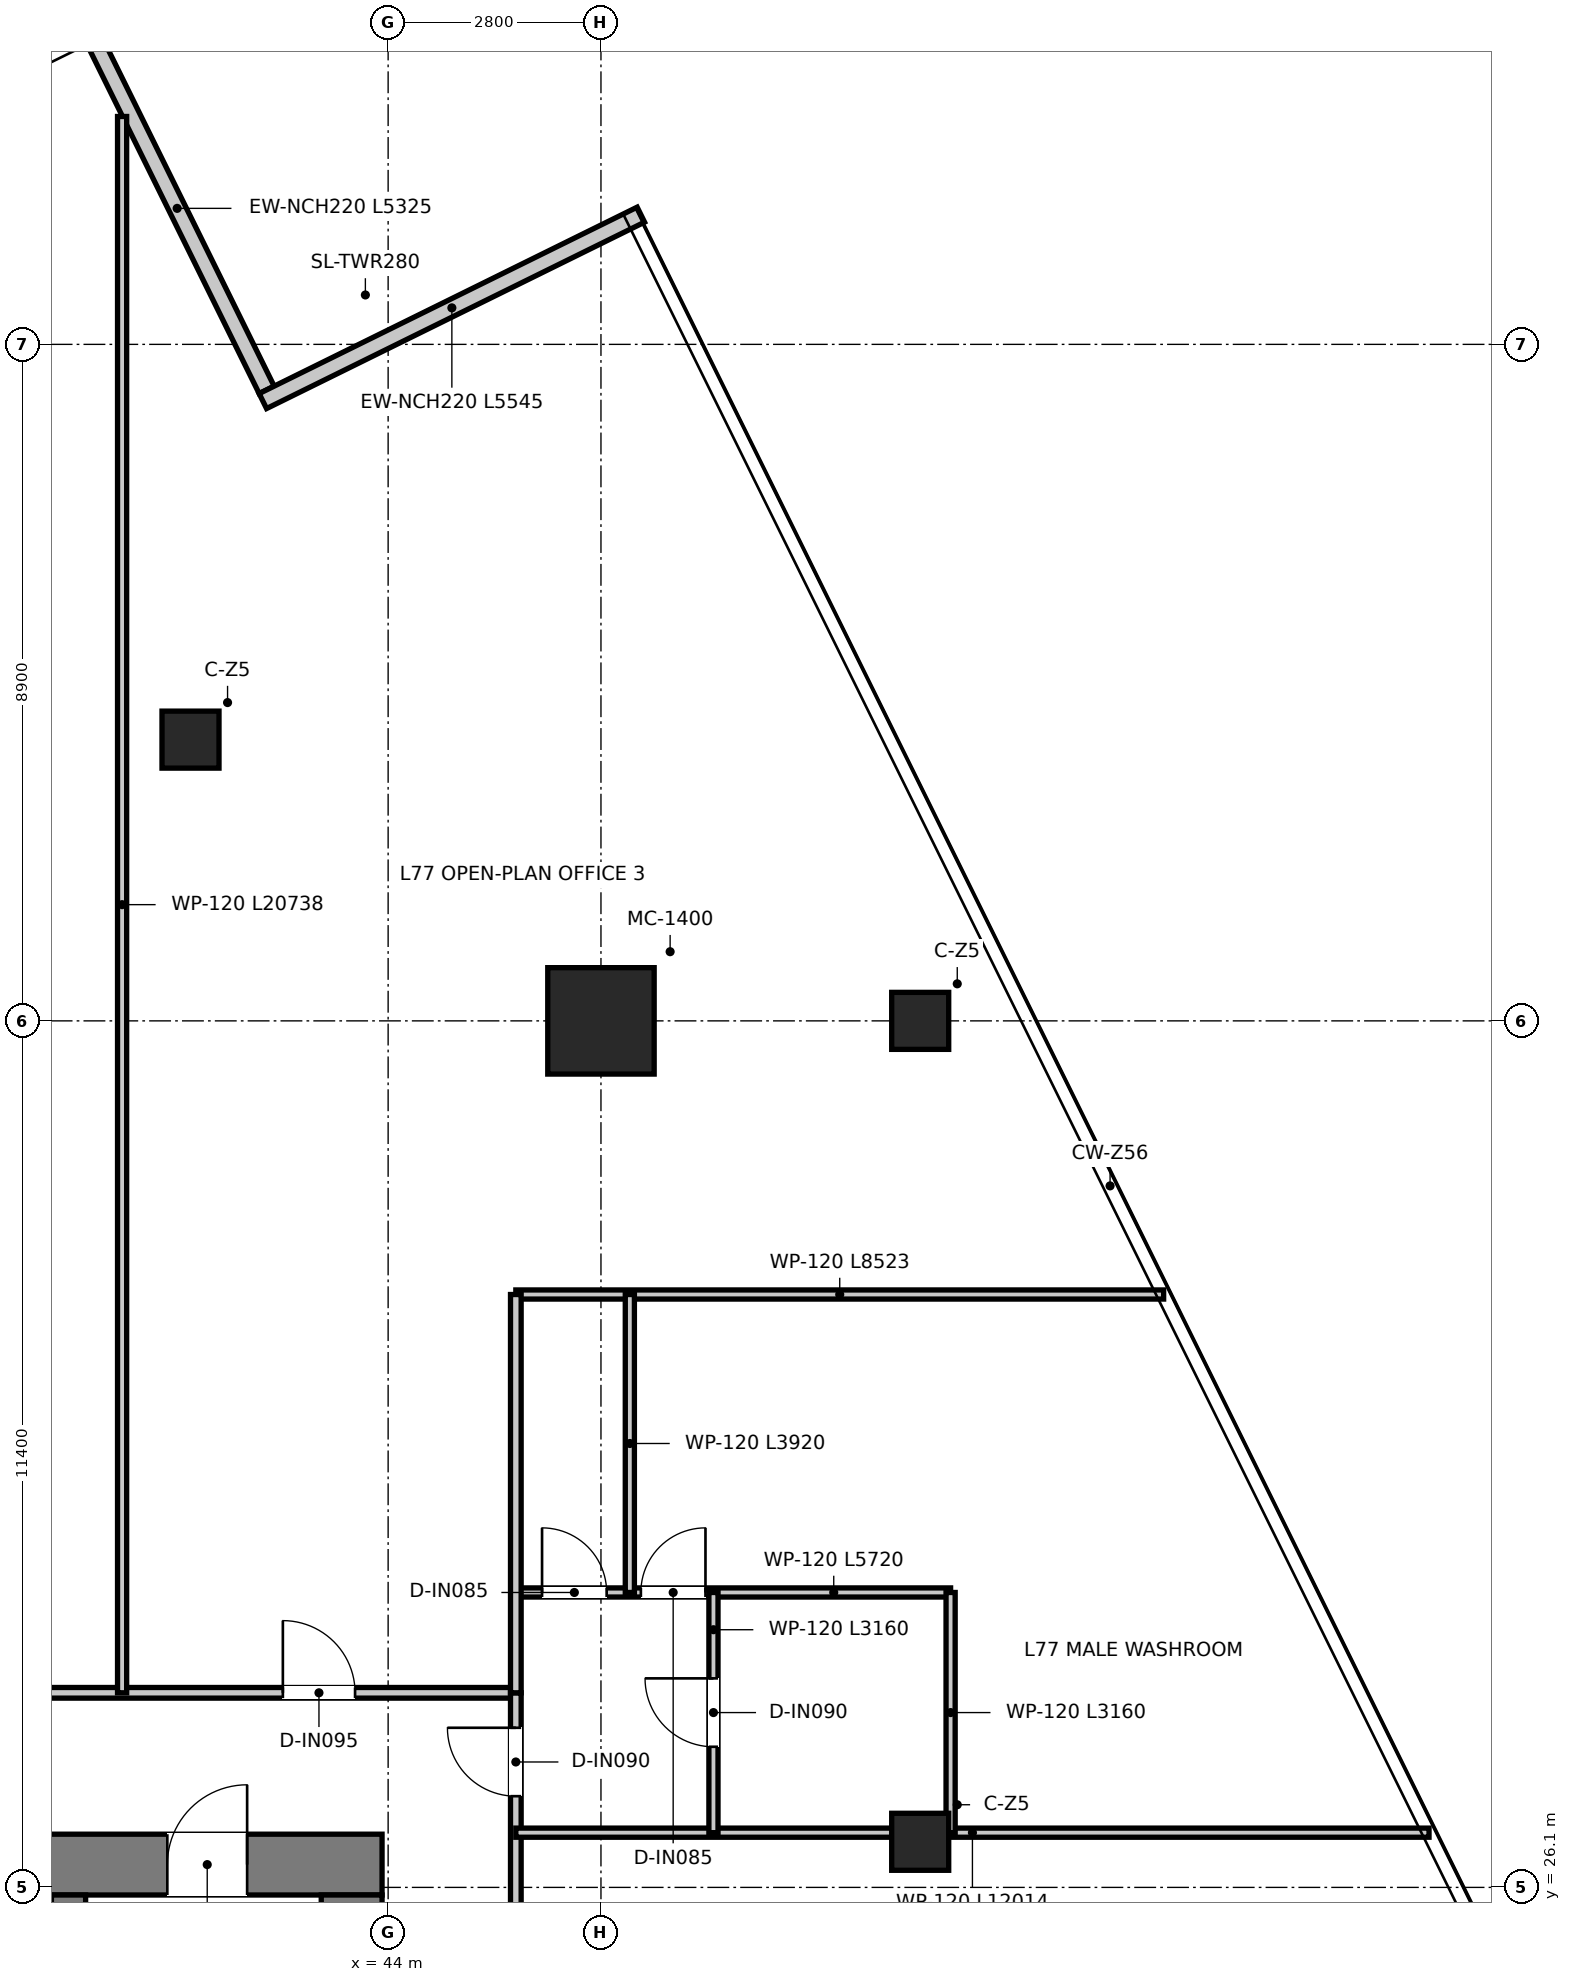
"""IFC4 building model, lengths in metres.
Left out: names, types, materials, properties, quantities, classifications, styles, units other than length and angle.
Written with IfcOpenShell. Run it as: python <this file> out.ifc"""

import sys

from ifc_helpers import new_model, si_unit, direction, frame, frame_2d, origin, origin_2d, place, context, subcontext, project, spatial, rectangle, extrude, source, transform, mapped, element, fill, save


model = new_model("IFC4")
c1 = context("Model", 3, precision=1e-05, world=origin(), true_north=direction((0.0, 1.0)))
c2 = subcontext(c1, "Body", "Model", "MODEL_VIEW")
j1 = project(units=[si_unit("LENGTHUNIT", "METRE"), si_unit("PLANEANGLEUNIT", "RADIAN")], contexts=[c1])
p1 = place(None, origin())
s1 = spatial("IfcSite", under=j1, at=p1, CompositionType="ELEMENT")
p2 = place(p1, origin())
s2 = spatial("IfcBuilding", under=s1, at=p2, CompositionType="ELEMENT")
p3 = place(p2, frame((0.0, 0.0, 314.8)))
s3 = spatial("IfcBuildingStorey", under=s2, at=p3, CompositionType="ELEMENT", Elevation=314.8)
p4 = place(p3, frame((28.08, 26.4, 0.0), z_axis=(0.0, 0.0, 1.0), x_axis=(1.0, 0.0, 0.0)))
e1 = element("IfcWall", 1, at=p4, inside=s3, PredefinedType="SHEAR", context=c2, shape_type="SweptSolid", body=[
    extrude(rectangle(XDim=15.84, YDim=0.8, at=frame_2d((7.92, 0.0))), origin(), (0.0, 0.0, 1.0), 3.95),
])
p5 = place(p4, frame((7.22, 0.0, 0.0)))
e2 = element("IfcOpeningElement", 2, at=p5, cuts=e1, PredefinedType="OPENING", context=c2, shape_type="SweptSolid", body=[
    extrude(rectangle(XDim=1.4, YDim=2.2, at=frame_2d((0.7, 1.1))), frame((0.0, 0.41, 0.0), z_axis=(0.0, -1.0, 0.0), x_axis=(1.0, 0.0, 0.0)), (0.0, 0.0, 1.0), 0.82),
])
p6 = place(p4, frame((1.775, 0.0, 0.0)))
e3 = element("IfcOpeningElement", 3, at=p6, cuts=e1, PredefinedType="OPENING", context=c2, shape_type="SweptSolid", body=[
    extrude(rectangle(XDim=1.05, YDim=2.1, at=frame_2d((0.525, 1.05))), frame((0.0, 0.41, 0.0), z_axis=(0.0, -1.0, 0.0), x_axis=(1.0, 0.0, 0.0)), (0.0, 0.0, 1.0), 0.82),
])
p7 = place(p4, frame((13.015, 0.0, 0.0)))
e4 = element("IfcOpeningElement", 4, at=p7, cuts=e1, PredefinedType="OPENING", context=c2, shape_type="SweptSolid", body=[
    extrude(rectangle(XDim=1.05, YDim=2.1, at=frame_2d((0.525, 1.05))), frame((0.0, 0.41, 0.0), z_axis=(0.0, -1.0, 0.0), x_axis=(1.0, 0.0, 0.0)), (0.0, 0.0, 1.0), 0.82),
])
p8 = place(p3, frame((43.52, 11.3, 0.0), z_axis=(0.0, 0.0, 1.0), x_axis=(0.0, 1.0, 0.0)))
e5 = element("IfcWall", 5, at=p8, inside=s3, PredefinedType="SHEAR", context=c2, shape_type="SweptSolid", body=[
    extrude(rectangle(XDim=14.7, YDim=0.8, at=frame_2d((7.35, 0.0))), origin(), (0.0, 0.0, 1.0), 3.95),
])
p9 = place(p3, frame((39.795, 13.22, 0.0), z_axis=(0.0, 0.0, 1.0), x_axis=(0.0, 1.0, 0.0)))
e6 = element("IfcWall", 6, at=p9, inside=s3, PredefinedType="SHEAR", context=c2, shape_type="SweptSolid", body=[
    extrude(rectangle(XDim=12.78, YDim=0.45, at=frame_2d((6.39, 0.0))), origin(), (0.0, 0.0, 1.0), 3.95),
])
p10 = place(p9, frame((10.58, 0.0, 0.0)))
e7 = element("IfcOpeningElement", 7, at=p10, cuts=e6, PredefinedType="OPENING", context=c2, shape_type="SweptSolid", body=[
    extrude(rectangle(XDim=1.1, YDim=2.15, at=frame_2d((0.55, 1.075))), frame((0.0, 0.235, 0.0), z_axis=(0.0, -1.0, 0.0), x_axis=(1.0, 0.0, 0.0)), (0.0, 0.0, 1.0), 0.47),
])
m1 = source(origin(), c2, "Body", "SweptSolid", [
    extrude(rectangle(XDim=1.4, YDim=1.4, at=origin_2d()), origin(), (0.0, 0.0, 1.0), 3.95),
])
p11 = place(p3, frame((46.8, 37.5, 0.0), z_axis=(0.0, 0.0, 1.0), x_axis=(1.0, 0.0, 0.0)))
e8 = element("IfcColumn", 8, at=p11, inside=s3, PredefinedType="USERDEFINED", context=c2, shape_type="MappedRepresentation", body=[
    mapped(m1, transform((0.0, 0.0, 0.0), x_axis=(1.0, 0.0, 0.0), y_axis=(0.0, 1.0, 0.0), z_axis=(0.0, 0.0, 1.0), scale=1.0)),
])
m2 = source(origin(), c2, "Body", "SweptSolid", [
    extrude(rectangle(XDim=0.75, YDim=0.75, at=origin_2d()), origin(), (0.0, 0.0, 1.0), 3.95),
])
for number, where, z_axis, x_axis in (
    (9, (41.4, 41.2, 0.0), (0.0, 0.0, 1.0), (1.0, 0.0, 0.0)),
    (10, (51.0, 37.5, 0.0), (0.0, 0.0, 1.0), (1.0, 0.0, 0.0)),
    (11, (51.0, 26.7, 0.0), (0.0, 0.0, 1.0), (1.0, 0.0, 0.0)),
):
    element("IfcColumn", number, at=place(p3, frame(where, z_axis=z_axis, x_axis=x_axis)), inside=s3, PredefinedType="COLUMN", context=c2, shape_type="MappedRepresentation", body=[
        mapped(m2, transform((0.0, 0.0, 0.0), x_axis=(1.0, 0.0, 0.0), y_axis=(0.0, 1.0, 0.0), z_axis=(0.0, 0.0, 1.0), scale=1.0)),
    ])
p12 = place(p3, frame((42.402, 45.801, 0.0), z_axis=(0.0, 0.0, 1.0), x_axis=(-0.442291978932, 0.896871119712, 0.0)))
e12 = element("IfcWall", 12, at=p12, inside=s3, PredefinedType="ELEMENTEDWALL", context=c2, shape_type="SweptSolid", body=[
    extrude(rectangle(XDim=5.325, YDim=0.22, at=frame_2d((2.663, 0.0))), origin(), (0.0, 0.0, 1.0), 3.59),
])
p13 = place(p3, frame((47.325, 48.106, 0.0), z_axis=(0.0, 0.0, 1.0), x_axis=(-0.896879244314, -0.442275503639, 0.0)))
e13 = element("IfcWall", 13, at=p13, inside=s3, PredefinedType="ELEMENTEDWALL", context=c2, shape_type="SweptSolid", body=[
    extrude(rectangle(XDim=5.545, YDim=0.22, at=frame_2d((2.772, 0.0))), origin(), (0.0, 0.0, 1.0), 3.59),
])
p14 = place(p3, frame((26.32, 28.66, 0.0), z_axis=(0.0, 0.0, 1.0), x_axis=(1.0, 0.0, 0.0)))
e14 = element("IfcWall", 14, at=p14, inside=s3, PredefinedType="PARTITIONING", context=c2, shape_type="SweptSolid", body=[
    extrude(rectangle(XDim=19.36, YDim=0.14, at=frame_2d((9.68, 0.0))), origin(), (0.0, 0.0, 1.0), 3.1),
])
p15 = place(p14, frame((2.865, 0.0, 0.0)))
e15 = element("IfcOpeningElement", 15, at=p15, cuts=e14, PredefinedType="OPENING", context=c2, shape_type="SweptSolid", body=[
    extrude(rectangle(XDim=0.95, YDim=2.1, at=frame_2d((0.475, 1.05))), frame((0.0, 0.08, 0.0), z_axis=(0.0, -1.0, 0.0), x_axis=(1.0, 0.0, 0.0)), (0.0, 0.0, 1.0), 0.16),
])
p16 = place(p14, frame((9.955, 0.0, 0.0)))
e16 = element("IfcOpeningElement", 16, at=p16, cuts=e14, PredefinedType="OPENING", context=c2, shape_type="SweptSolid", body=[
    extrude(rectangle(XDim=0.95, YDim=2.1, at=frame_2d((0.475, 1.05))), frame((0.0, 0.08, 0.0), z_axis=(0.0, -1.0, 0.0), x_axis=(1.0, 0.0, 0.0)), (0.0, 0.0, 1.0), 0.16),
])
p17 = place(p14, frame((16.295, 0.0, 0.0)))
e17 = element("IfcOpeningElement", 17, at=p17, cuts=e14, PredefinedType="OPENING", context=c2, shape_type="SweptSolid", body=[
    extrude(rectangle(XDim=0.95, YDim=2.1, at=frame_2d((0.475, 1.05))), frame((0.0, 0.08, 0.0), z_axis=(0.0, -1.0, 0.0), x_axis=(1.0, 0.0, 0.0)), (0.0, 0.0, 1.0), 0.16),
])
p18 = place(p3, frame((45.68, 9.72, 0.0), z_axis=(0.0, 0.0, 1.0), x_axis=(0.0, 1.0, 0.0)))
e18 = element("IfcWall", 18, at=p18, inside=s3, PredefinedType="PARTITIONING", context=c2, shape_type="SweptSolid", body=[
    extrude(rectangle(XDim=18.94, YDim=0.14, at=frame_2d((9.47, 0.0))), origin(), (0.0, 0.0, 1.0), 3.05),
])
p19 = place(p18, frame((17.58, 0.0, 0.0)))
e19 = element("IfcOpeningElement", 19, at=p19, cuts=e18, PredefinedType="OPENING", context=c2, shape_type="SweptSolid", body=[
    extrude(rectangle(XDim=0.9, YDim=2.1, at=frame_2d((0.45, 1.05))), frame((0.0, 0.08, 0.0), z_axis=(0.0, -1.0, 0.0), x_axis=(1.0, 0.0, 0.0)), (0.0, 0.0, 1.0), 0.16),
])
p20 = place(p18, frame((11.99, 0.0, 0.0)))
e20 = element("IfcOpeningElement", 20, at=p20, cuts=e18, PredefinedType="OPENING", context=c2, shape_type="SweptSolid", body=[
    extrude(rectangle(XDim=0.9, YDim=2.1, at=frame_2d((0.45, 1.05))), frame((0.0, 0.08, 0.0), z_axis=(0.0, -1.0, 0.0), x_axis=(1.0, 0.0, 0.0)), (0.0, 0.0, 1.0), 0.16),
])
p21 = place(p3, frame((45.68, 26.82, 0.0), z_axis=(0.0, 0.0, 1.0), x_axis=(1.0, 0.0, 0.0)))
e21 = element("IfcWall", 21, at=p21, inside=s3, PredefinedType="PARTITIONING", context=c2, shape_type="SweptSolid", body=[
    extrude(rectangle(XDim=12.014, YDim=0.12, at=frame_2d((6.007, 0.0))), origin(), (0.0, 0.0, 1.0), 3.05),
])
p22 = place(p3, frame((45.68, 33.9, 0.0), z_axis=(0.0, 0.0, 1.0), x_axis=(1.0, 0.0, 0.0)))
e22 = element("IfcWall", 22, at=p22, inside=s3, PredefinedType="PARTITIONING", context=c2, shape_type="SweptSolid", body=[
    extrude(rectangle(XDim=8.523, YDim=0.12, at=frame_2d((4.261, 0.0))), origin(), (0.0, 0.0, 1.0), 3.05),
])
p23 = place(p3, frame((45.68, 29.98, 0.0), z_axis=(0.0, 0.0, 1.0), x_axis=(1.0, 0.0, 0.0)))
e23 = element("IfcWall", 23, at=p23, inside=s3, PredefinedType="PARTITIONING", context=c2, shape_type="SweptSolid", body=[
    extrude(rectangle(XDim=5.72, YDim=0.12, at=frame_2d((2.86, 0.0))), origin(), (0.0, 0.0, 1.0), 3.05),
])
p24 = place(p23, frame((1.645, 0.0, 0.0)))
e24 = element("IfcOpeningElement", 24, at=p24, cuts=e23, PredefinedType="OPENING", context=c2, shape_type="SweptSolid", body=[
    extrude(rectangle(XDim=0.85, YDim=2.1, at=frame_2d((0.425, 1.05))), frame((0.0, 0.07, 0.0), z_axis=(0.0, -1.0, 0.0), x_axis=(1.0, 0.0, 0.0)), (0.0, 0.0, 1.0), 0.14),
])
p25 = place(p23, frame((0.345, 0.0, 0.0)))
e25 = element("IfcOpeningElement", 25, at=p25, cuts=e23, PredefinedType="OPENING", context=c2, shape_type="SweptSolid", body=[
    extrude(rectangle(XDim=0.85, YDim=2.1, at=frame_2d((0.425, 1.05))), frame((0.0, 0.07, 0.0), z_axis=(0.0, -1.0, 0.0), x_axis=(1.0, 0.0, 0.0)), (0.0, 0.0, 1.0), 0.14),
])
p26 = place(p3, frame((51.4, 26.82, 0.0), z_axis=(0.0, 0.0, 1.0), x_axis=(0.0, 1.0, 0.0)))
e26 = element("IfcWall", 26, at=p26, inside=s3, PredefinedType="PARTITIONING", context=c2, shape_type="SweptSolid", body=[
    extrude(rectangle(XDim=3.16, YDim=0.12, at=frame_2d((1.58, 0.0))), origin(), (0.0, 0.0, 1.0), 3.59),
])
p27 = place(p3, frame((48.28, 26.82, 0.0), z_axis=(0.0, 0.0, 1.0), x_axis=(0.0, 1.0, 0.0)))
e27 = element("IfcWall", 27, at=p27, inside=s3, PredefinedType="PARTITIONING", context=c2, shape_type="SweptSolid", body=[
    extrude(rectangle(XDim=3.16, YDim=0.12, at=frame_2d((1.58, 0.0))), origin(), (0.0, 0.0, 1.0), 3.1),
])
p28 = place(p27, frame((1.13, 0.0, 0.0)))
e28 = element("IfcOpeningElement", 28, at=p28, cuts=e27, PredefinedType="OPENING", context=c2, shape_type="SweptSolid", body=[
    extrude(rectangle(XDim=0.9, YDim=2.1, at=frame_2d((0.45, 1.05))), frame((0.0, 0.07, 0.0), z_axis=(0.0, -1.0, 0.0), x_axis=(1.0, 0.0, 0.0)), (0.0, 0.0, 1.0), 0.14),
])
p29 = place(p3, frame((47.18, 29.98, 0.0), z_axis=(0.0, 0.0, 1.0), x_axis=(0.0, 1.0, 0.0)))
e29 = element("IfcWall", 29, at=p29, inside=s3, PredefinedType="PARTITIONING", context=c2, shape_type="SweptSolid", body=[
    extrude(rectangle(XDim=3.92, YDim=0.12, at=frame_2d((1.96, 0.0))), origin(), (0.0, 0.0, 1.0), 3.23),
])
p30 = place(p3, frame((45.68, 28.66, 0.0), z_axis=(0.0, 0.0, 1.0), x_axis=(0.0, 1.0, 0.0)))
e30 = element("IfcWall", 30, at=p30, inside=s3, PredefinedType="PARTITIONING", context=c2, shape_type="SweptSolid", body=[
    extrude(rectangle(XDim=5.24, YDim=0.14, at=frame_2d((2.62, 0.0))), origin(), (0.0, 0.0, 1.0), 3.35),
])
p31 = place(p3, frame((40.5, 28.66, 0.0), z_axis=(0.0, 0.0, 1.0), x_axis=(0.0, 1.0, 0.0)))
e31 = element("IfcWall", 31, at=p31, inside=s3, PredefinedType="PARTITIONING", context=c2, shape_type="SweptSolid", body=[
    extrude(rectangle(XDim=20.738, YDim=0.12, at=frame_2d((10.369, 0.0))), origin(), (0.0, 0.0, 1.0), 3.05),
])
p32 = place(p7, origin())
e32 = element("IfcDoor", 32, at=p32, inside=s3, OperationType="SINGLE_SWING_RIGHT", PredefinedType="DOOR", context=c2, shape_type="SweptSolid", body=[
    extrude(rectangle(XDim=1.05, YDim=2.1, at=frame_2d((0.525, 1.05))), frame((0.0, 0.025, 0.0), z_axis=(0.0, -1.0, 0.0), x_axis=(1.0, 0.0, 0.0)), (0.0, 0.0, 1.0), 0.05),
])
fill(e4, e32)
p33 = place(p19, origin())
e33 = element("IfcDoor", 33, at=p33, inside=s3, OperationType="SINGLE_SWING_RIGHT", PredefinedType="DOOR", context=c2, shape_type="SweptSolid", body=[
    extrude(rectangle(XDim=0.9, YDim=2.1, at=frame_2d((0.45, 1.05))), frame((0.0, 0.025, 0.0), z_axis=(0.0, -1.0, 0.0), x_axis=(1.0, 0.0, 0.0)), (0.0, 0.0, 1.0), 0.05),
])
fill(e19, e33)
p34 = place(p24, origin())
e34 = element("IfcDoor", 34, at=p34, inside=s3, OperationType="SINGLE_SWING_RIGHT", PredefinedType="DOOR", context=c2, shape_type="SweptSolid", body=[
    extrude(rectangle(XDim=0.85, YDim=2.1, at=frame_2d((0.425, 1.05))), frame((0.0, 0.025, 0.0), z_axis=(0.0, -1.0, 0.0), x_axis=(1.0, 0.0, 0.0)), (0.0, 0.0, 1.0), 0.05),
])
fill(e24, e34)
p35 = place(p25, origin())
e35 = element("IfcDoor", 35, at=p35, inside=s3, OperationType="SINGLE_SWING_LEFT", PredefinedType="DOOR", context=c2, shape_type="SweptSolid", body=[
    extrude(rectangle(XDim=0.85, YDim=2.1, at=frame_2d((0.425, 1.05))), frame((0.0, 0.025, 0.0), z_axis=(0.0, -1.0, 0.0), x_axis=(1.0, 0.0, 0.0)), (0.0, 0.0, 1.0), 0.05),
])
fill(e25, e35)
p36 = place(p28, origin())
e36 = element("IfcDoor", 36, at=p36, inside=s3, OperationType="SINGLE_SWING_RIGHT", PredefinedType="DOOR", context=c2, shape_type="SweptSolid", body=[
    extrude(rectangle(XDim=0.9, YDim=2.1, at=frame_2d((0.45, 1.05))), frame((0.0, 0.025, 0.0), z_axis=(0.0, -1.0, 0.0), x_axis=(1.0, 0.0, 0.0)), (0.0, 0.0, 1.0), 0.05),
])
fill(e28, e36)
p37 = place(p17, origin())
e37 = element("IfcDoor", 37, at=p37, inside=s3, OperationType="SINGLE_SWING_LEFT", PredefinedType="DOOR", context=c2, shape_type="SweptSolid", body=[
    extrude(rectangle(XDim=0.95, YDim=2.1, at=frame_2d((0.475, 1.05))), frame((0.0, 0.025, 0.0), z_axis=(0.0, -1.0, 0.0), x_axis=(1.0, 0.0, 0.0)), (0.0, 0.0, 1.0), 0.05),
])
fill(e17, e37)
save(model, sys.argv[1])
